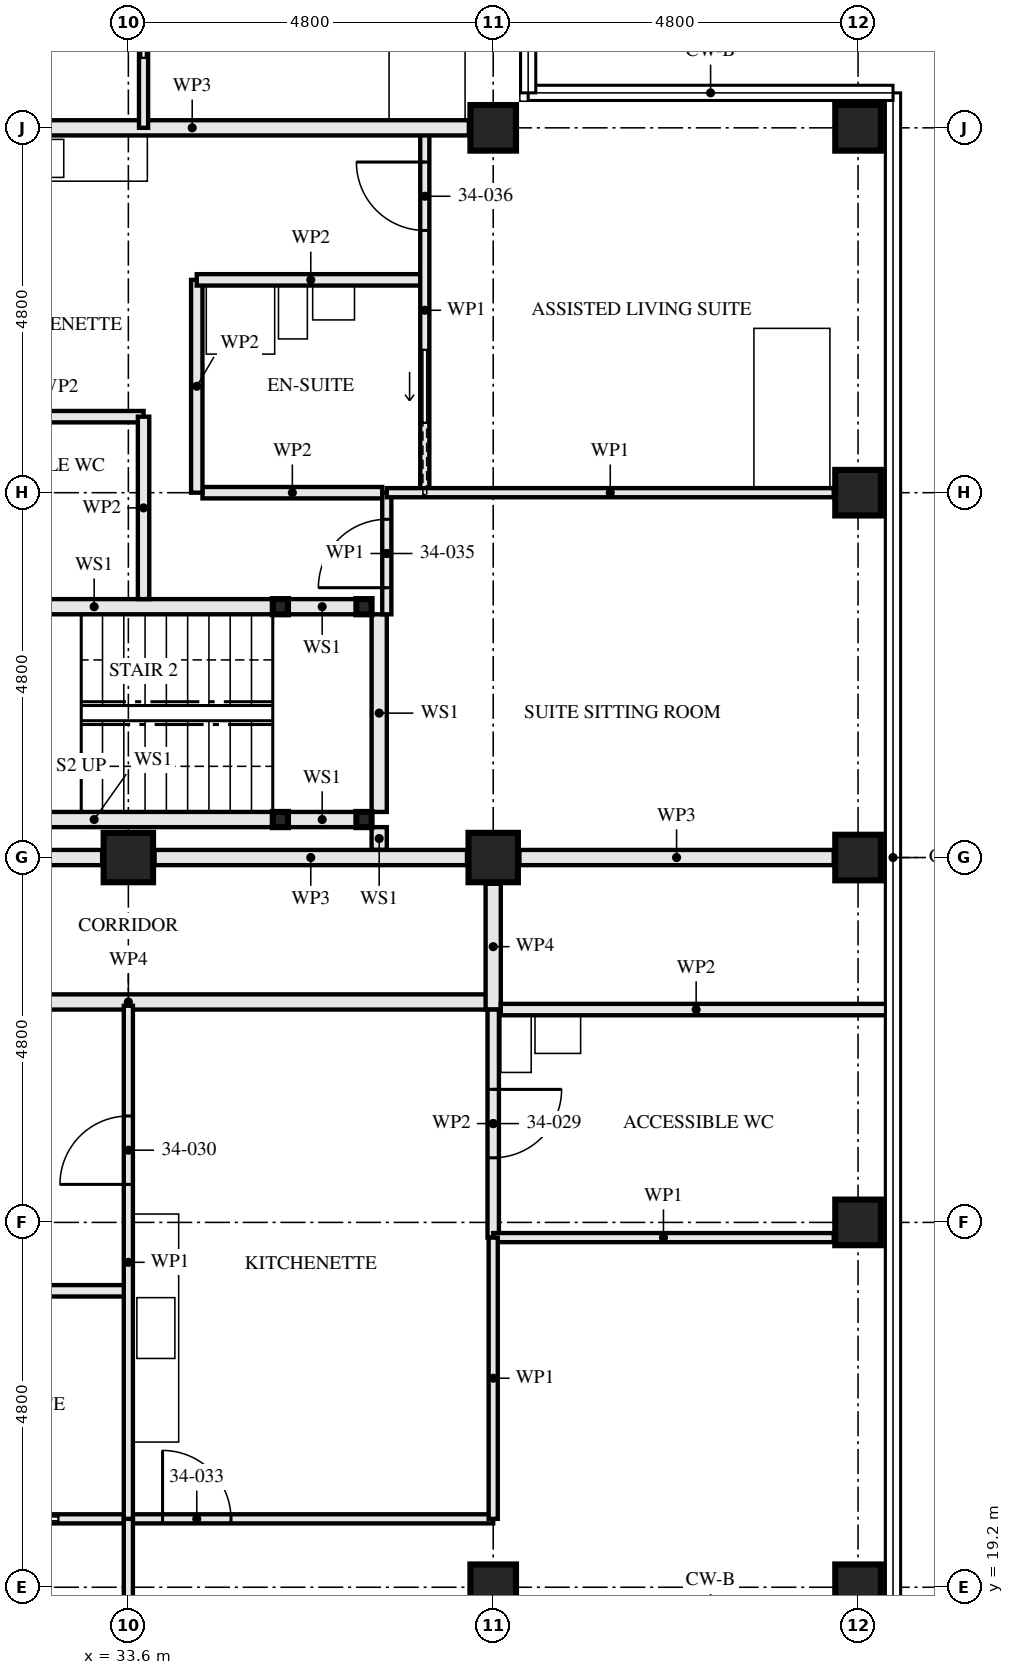
"""IFC4 building model, lengths in metres.
Left out: names, types, materials, properties, quantities, classifications, styles, units other than length and angle.
Written with IfcOpenShell. Run it as: python <this file> out.ifc"""

import sys

from ifc_helpers import new_model, si_unit, direction, frame, frame_2d, origin, origin_2d, place, context, subcontext, project, spatial, rectangle, hollow_rectangle, extrude, element, fill, save


model = new_model("IFC4")
c1 = context("Model", 3, precision=1e-05, world=origin(), true_north=direction((0.0, 1.0)))
c2 = subcontext(c1, "Body", "Model", "MODEL_VIEW")
j1 = project(units=[si_unit("LENGTHUNIT", "METRE"), si_unit("PLANEANGLEUNIT", "RADIAN")], contexts=[c1])
p1 = place(None, origin())
s1 = spatial("IfcSite", under=j1, at=p1, CompositionType="ELEMENT")
p2 = place(p1, origin())
s2 = spatial("IfcBuilding", under=s1, at=p2, CompositionType="ELEMENT")
p3 = place(p2, frame((0.0, 0.0, 126.0)))
s3 = spatial("IfcBuildingStorey", under=s2, at=p3, CompositionType="ELEMENT", Elevation=126.0)
p4 = place(p3, frame((33.6, 28.8, 0.0), z_axis=(0.0, 0.0, 1.0), x_axis=(0.0, 1.0, 0.0)))
e1 = element("IfcColumn", 1, at=p4, inside=s3, PredefinedType="COLUMN", context=c2, shape_type="SweptSolid", body=[
    extrude(hollow_rectangle(XDim=0.65, YDim=0.65, WallThickness=0.05, at=origin_2d()), origin(), (0.0, 0.0, 1.0), 3.5),
])
p5 = place(p3, frame((38.4, 19.2, 0.0), z_axis=(0.0, 0.0, 1.0), x_axis=(0.0, 1.0, 0.0)))
e2 = element("IfcColumn", 2, at=p5, inside=s3, PredefinedType="COLUMN", context=c2, shape_type="SweptSolid", body=[
    extrude(hollow_rectangle(XDim=0.6, YDim=0.6, WallThickness=0.08, at=origin_2d()), origin(), (0.0, 0.0, 1.0), 3.5),
])
p6 = place(p3, frame((38.4, 28.8, 0.0), z_axis=(0.0, 0.0, 1.0), x_axis=(0.0, 1.0, 0.0)))
e3 = element("IfcColumn", 3, at=p6, inside=s3, PredefinedType="COLUMN", context=c2, shape_type="SweptSolid", body=[
    extrude(hollow_rectangle(XDim=0.65, YDim=0.65, WallThickness=0.05, at=origin_2d()), origin(), (0.0, 0.0, 1.0), 3.5),
])
for number, where, z_axis, x_axis in (
    (4, (38.4, 38.4, 0.0), (0.0, 0.0, 1.0), (0.0, 1.0, 0.0)),
    (5, (43.2, 19.2, 0.0), (0.0, 0.0, 1.0), (0.0, 1.0, 0.0)),
    (6, (43.2, 24.0, 0.0), (0.0, 0.0, 1.0), (1.0, 0.0, 0.0)),
    (7, (43.2, 28.8, 0.0), (0.0, 0.0, 1.0), (0.0, 1.0, 0.0)),
    (8, (43.2, 33.6, 0.0), (0.0, 0.0, 1.0), (1.0, 0.0, 0.0)),
    (9, (43.2, 38.4, 0.0), (0.0, 0.0, 1.0), (0.0, 1.0, 0.0)),
):
    element("IfcColumn", number, at=place(p3, frame(where, z_axis=z_axis, x_axis=x_axis)), inside=s3, PredefinedType="COLUMN", context=c2, shape_type="SweptSolid", body=[
        extrude(hollow_rectangle(XDim=0.6, YDim=0.6, WallThickness=0.08, at=origin_2d()), origin(), (0.0, 0.0, 1.0), 3.5),
    ])
for number, where, z_axis, x_axis in (
    (10, (36.7, 29.3, 0.0), (0.0, 0.0, 1.0), (1.0, 0.0, 0.0)),
    (11, (36.7, 32.1, 0.0), (0.0, 0.0, 1.0), (1.0, 0.0, 0.0)),
    (12, (35.6, 29.3, 0.0), (0.0, 0.0, 1.0), (1.0, 0.0, 0.0)),
    (13, (35.6, 32.1, 0.0), (0.0, 0.0, 1.0), (1.0, 0.0, 0.0)),
):
    element("IfcColumn", number, at=place(p3, frame(where, z_axis=z_axis, x_axis=x_axis)), inside=s3, PredefinedType="COLUMN", context=c2, shape_type="SweptSolid", body=[
        extrude(hollow_rectangle(XDim=0.2, YDim=0.2, WallThickness=0.008, at=origin_2d()), origin(), (0.0, 0.0, 1.0), 3.33),
    ])
p7 = place(p3, frame((30.8, 23.1, 0.0), z_axis=(0.0, 0.0, 1.0), x_axis=(1.0, 0.0, 0.0)))
e14 = element("IfcWall", 14, at=p7, inside=s3, PredefinedType="PARTITIONING", context=c2, shape_type="SweptSolid", body=[
    extrude(rectangle(XDim=2.8, YDim=0.15, at=frame_2d((1.4, 0.0))), origin(), (0.0, 0.0, 1.0), 3.33),
])
p8 = place(p3, frame((38.4, 23.8, 0.0), z_axis=(0.0, 0.0, 1.0), x_axis=(0.0, 1.0, 0.0)))
e15 = element("IfcWall", 15, at=p8, inside=s3, PredefinedType="PARTITIONING", context=c2, shape_type="SweptSolid", body=[
    extrude(rectangle(XDim=3.0, YDim=0.15, at=frame_2d((1.5, 0.0))), origin(), (0.0, 0.0, 1.0), 2.55),
])
p9 = place(p8, frame((1.05, 0.0, 0.0)))
e16 = element("IfcOpeningElement", 16, at=p9, cuts=e15, PredefinedType="OPENING", context=c2, shape_type="SweptSolid", body=[
    extrude(rectangle(XDim=0.9, YDim=2.1, at=frame_2d((0.45, 1.05))), frame((0.0, 0.085, 0.0), z_axis=(0.0, -1.0, 0.0), x_axis=(1.0, 0.0, 0.0)), (0.0, 0.0, 1.0), 0.171),
])
p10 = place(p3, frame((33.6, 20.1, 0.0), z_axis=(0.0, 0.0, 1.0), x_axis=(0.0, 1.0, 0.0)))
e17 = element("IfcWall", 17, at=p10, inside=s3, PredefinedType="PARTITIONING", context=c2, shape_type="SweptSolid", body=[
    extrude(rectangle(XDim=6.75, YDim=0.12, at=frame_2d((3.375, 0.0))), origin(), (0.0, 0.0, 1.0), 2.55),
])
p11 = place(p10, frame((4.4, 0.0, 0.0)))
e18 = element("IfcOpeningElement", 18, at=p11, cuts=e17, PredefinedType="OPENING", context=c2, shape_type="SweptSolid", body=[
    extrude(rectangle(XDim=0.9, YDim=2.1, at=frame_2d((0.45, 1.05))), frame((0.0, 0.071, 0.0), z_axis=(0.0, -1.0, 0.0), x_axis=(1.0, 0.0, 0.0)), (0.0, 0.0, 1.0), 0.141),
])
p12 = place(p3, frame((28.8, 20.1, 0.0), z_axis=(0.0, 0.0, 1.0), x_axis=(1.0, 0.0, 0.0)))
e19 = element("IfcWall", 19, at=p12, inside=s3, PredefinedType="PARTITIONING", context=c2, shape_type="SweptSolid", body=[
    extrude(rectangle(XDim=4.8, YDim=0.12, at=frame_2d((2.4, 0.0))), origin(), (0.0, 0.0, 1.0), 3.33),
])
p13 = place(p12, frame((0.45, 0.0, 0.0)))
e20 = element("IfcOpeningElement", 20, at=p13, cuts=e19, PredefinedType="OPENING", context=c2, shape_type="SweptSolid", body=[
    extrude(rectangle(XDim=0.9, YDim=2.1, at=frame_2d((0.45, 1.05))), frame((0.0, 0.071, 0.0), z_axis=(0.0, -1.0, 0.0), x_axis=(1.0, 0.0, 0.0)), (0.0, 0.0, 1.0), 0.141),
])
p14 = place(p12, frame((2.925, 0.0, 0.0)))
e21 = element("IfcOpeningElement", 21, at=p14, cuts=e19, PredefinedType="OPENING", context=c2, shape_type="SweptSolid", body=[
    extrude(rectangle(XDim=0.95, YDim=2.1, at=frame_2d((0.475, 1.05))), frame((0.0, 0.071, 0.0), z_axis=(0.0, -1.0, 0.0), x_axis=(1.0, 0.0, 0.0)), (0.0, 0.0, 1.0), 0.141),
])
p15 = place(p3, frame((33.6, 20.1, 0.0), z_axis=(0.0, 0.0, 1.0), x_axis=(1.0, 0.0, 0.0)))
e22 = element("IfcWall", 22, at=p15, inside=s3, PredefinedType="PARTITIONING", context=c2, shape_type="SweptSolid", body=[
    extrude(rectangle(XDim=4.8, YDim=0.12, at=frame_2d((2.4, 0.0))), origin(), (0.0, 0.0, 1.0), 3.33),
])
p16 = place(p15, frame((0.45, 0.0, 0.0)))
e23 = element("IfcOpeningElement", 23, at=p16, cuts=e22, PredefinedType="OPENING", context=c2, shape_type="SweptSolid", body=[
    extrude(rectangle(XDim=0.9, YDim=2.1, at=frame_2d((0.45, 1.05))), frame((0.0, 0.071, 0.0), z_axis=(0.0, -1.0, 0.0), x_axis=(1.0, 0.0, 0.0)), (0.0, 0.0, 1.0), 0.141),
])
p17 = place(p3, frame((38.4, 23.8, 0.0), z_axis=(0.0, 0.0, 1.0), x_axis=(1.0, 0.0, 0.0)))
e24 = element("IfcWall", 24, at=p17, inside=s3, PredefinedType="PARTITIONING", context=c2, shape_type="SweptSolid", body=[
    extrude(rectangle(XDim=4.48, YDim=0.12, at=frame_2d((2.24, 0.0))), origin(), (0.0, 0.0, 1.0), 3.33),
])
p18 = place(p3, frame((33.6, 14.72, 0.0), z_axis=(0.0, 0.0, 1.0), x_axis=(0.0, 1.0, 0.0)))
e25 = element("IfcWall", 25, at=p18, inside=s3, PredefinedType="PARTITIONING", context=c2, shape_type="SweptSolid", body=[
    extrude(rectangle(XDim=5.38, YDim=0.12, at=frame_2d((2.69, 0.0))), origin(), (0.0, 0.0, 1.0), 2.55),
])
p19 = place(p3, frame((38.4, 20.1, 0.0), z_axis=(0.0, 0.0, 1.0), x_axis=(0.0, 1.0, 0.0)))
e26 = element("IfcWall", 26, at=p19, inside=s3, PredefinedType="PARTITIONING", context=c2, shape_type="SweptSolid", body=[
    extrude(rectangle(XDim=3.7, YDim=0.12, at=frame_2d((1.85, 0.0))), origin(), (0.0, 0.0, 1.0), 3.33),
])
p20 = place(p3, frame((28.8, 26.9, 0.0), z_axis=(0.0, 0.0, 1.0), x_axis=(1.0, 0.0, 0.0)))
e27 = element("IfcWall", 27, at=p20, inside=s3, PredefinedType="PARTITIONING", context=c2, shape_type="SweptSolid", body=[
    extrude(rectangle(XDim=9.6, YDim=0.2, at=frame_2d((4.8, 0.0))), origin(), (0.0, 0.0, 1.0), 3.33),
])
p21 = place(p20, frame((0.4, 0.0, 0.0)))
e28 = element("IfcOpeningElement", 28, at=p21, cuts=e27, PredefinedType="OPENING", context=c2, shape_type="SweptSolid", body=[
    extrude(rectangle(XDim=1.0, YDim=2.1, at=frame_2d((0.5, 1.05))), frame((0.0, 0.111, 0.0), z_axis=(0.0, -1.0, 0.0), x_axis=(1.0, 0.0, 0.0)), (0.0, 0.0, 1.0), 0.221),
])
p22 = place(p3, frame((38.4, 26.8, 0.0), z_axis=(0.0, 0.0, 1.0), x_axis=(0.0, 1.0, 0.0)))
e29 = element("IfcWall", 29, at=p22, inside=s3, PredefinedType="PARTITIONING", context=c2, shape_type="SweptSolid", body=[
    extrude(rectangle(XDim=1.655, YDim=0.2, at=frame_2d((0.828, 0.0))), origin(), (0.0, 0.0, 1.0), 3.33),
])
p23 = place(p3, frame((36.6, 29.3, 0.0), z_axis=(0.0, 0.0, 1.0), x_axis=(-1.0, 0.0, 0.0)))
e30 = element("IfcWall", 30, at=p23, inside=s3, PredefinedType="SOLIDWALL", context=c2, shape_type="SweptSolid", body=[
    extrude(rectangle(XDim=0.9, YDim=0.2, at=frame_2d((0.45, 0.0))), origin(), (0.0, 0.0, 1.0), 2.99),
])
p24 = place(p3, frame((35.5, 29.3, 0.0), z_axis=(0.0, 0.0, 1.0), x_axis=(-1.0, 0.0, 0.0)))
e31 = element("IfcWall", 31, at=p24, inside=s3, PredefinedType="SOLIDWALL", context=c2, shape_type="SweptSolid", body=[
    extrude(rectangle(XDim=4.7, YDim=0.2, at=frame_2d((2.35, 0.0))), origin(), (0.0, 0.0, 1.0), 2.99),
])
p25 = place(p3, frame((36.6, 32.1, 0.0), z_axis=(0.0, 0.0, 1.0), x_axis=(-1.0, 0.0, 0.0)))
e32 = element("IfcWall", 32, at=p25, inside=s3, PredefinedType="SOLIDWALL", context=c2, shape_type="SweptSolid", body=[
    extrude(rectangle(XDim=0.9, YDim=0.2, at=frame_2d((0.45, 0.0))), origin(), (0.0, 0.0, 1.0), 2.99),
])
p26 = place(p3, frame((35.5, 32.1, 0.0), z_axis=(0.0, 0.0, 1.0), x_axis=(-1.0, 0.0, 0.0)))
e33 = element("IfcWall", 33, at=p26, inside=s3, PredefinedType="SOLIDWALL", context=c2, shape_type="SweptSolid", body=[
    extrude(rectangle(XDim=4.7, YDim=0.2, at=frame_2d((2.35, 0.0))), origin(), (0.0, 0.0, 1.0), 2.99),
])
p27 = place(p3, frame((36.9, 28.9, 0.0), z_axis=(0.0, 0.0, 1.0), x_axis=(0.0, 1.0, 0.0)))
e34 = element("IfcWall", 34, at=p27, inside=s3, PredefinedType="SOLIDWALL", context=c2, shape_type="SweptSolid", body=[
    extrude(rectangle(XDim=0.3, YDim=0.2, at=frame_2d((0.15, 0.0))), origin(), (0.0, 0.0, 1.0), 3.33),
])
p28 = place(p3, frame((36.9, 29.4, 0.0), z_axis=(0.0, 0.0, 1.0), x_axis=(0.0, 1.0, 0.0)))
e35 = element("IfcWall", 35, at=p28, inside=s3, PredefinedType="SOLIDWALL", context=c2, shape_type="SweptSolid", body=[
    extrude(rectangle(XDim=2.6, YDim=0.2, at=frame_2d((1.3, 0.0))), origin(), (0.0, 0.0, 1.0), 3.33),
])
p29 = place(p3, frame((33.8, 32.2, 0.0), z_axis=(0.0, 0.0, 1.0), x_axis=(0.0, 1.0, 0.0)))
e36 = element("IfcWall", 36, at=p29, inside=s3, PredefinedType="PARTITIONING", context=c2, shape_type="SweptSolid", body=[
    extrude(rectangle(XDim=2.4, YDim=0.15, at=frame_2d((1.2, 0.0))), origin(), (0.0, 0.0, 1.0), 2.55),
])
for number, where, z_axis, x_axis in (
    (37, (33.8, 34.6, 0.0), (0.0, 0.0, 1.0), (-1.0, 0.0, 0.0)),
    (38, (37.5, 36.4, 0.0), (0.0, 0.0, 1.0), (-1.0, 0.0, 0.0)),
):
    element("IfcWall", number, at=place(p3, frame(where, z_axis=z_axis, x_axis=x_axis)), inside=s3, PredefinedType="PARTITIONING", context=c2, shape_type="SweptSolid", body=[
        extrude(rectangle(XDim=3.0, YDim=0.15, at=frame_2d((1.5, 0.0))), origin(), (0.0, 0.0, 1.0), 3.33),
    ])
p30 = place(p3, frame((34.5, 33.6, 0.0), z_axis=(0.0, 0.0, 1.0), x_axis=(0.0, 1.0, 0.0)))
e39 = element("IfcWall", 39, at=p30, inside=s3, PredefinedType="PARTITIONING", context=c2, shape_type="SweptSolid", body=[
    extrude(rectangle(XDim=2.8, YDim=0.15, at=frame_2d((1.4, 0.0))), origin(), (0.0, 0.0, 1.0), 3.33),
])
p31 = place(p3, frame((37.0, 32.0, 0.0), z_axis=(0.0, 0.0, 1.0), x_axis=(0.0, 1.0, 0.0)))
e40 = element("IfcWall", 40, at=p31, inside=s3, PredefinedType="PARTITIONING", context=c2, shape_type="SweptSolid", body=[
    extrude(rectangle(XDim=1.6, YDim=0.12, at=frame_2d((0.8, 0.0))), origin(), (0.0, 0.0, 1.0), 3.33),
])
p32 = place(p31, frame((0.35, 0.0, 0.0)))
e41 = element("IfcOpeningElement", 41, at=p32, cuts=e40, PredefinedType="OPENING", context=c2, shape_type="SweptSolid", body=[
    extrude(rectangle(XDim=0.9, YDim=2.1, at=frame_2d((0.45, 1.05))), frame((0.0, 0.071, 0.0), z_axis=(0.0, -1.0, 0.0), x_axis=(1.0, 0.0, 0.0)), (0.0, 0.0, 1.0), 0.141),
])
p33 = place(p3, frame((37.5, 33.6, 0.0), z_axis=(0.0, 0.0, 1.0), x_axis=(0.0, 1.0, 0.0)))
e42 = element("IfcWall", 42, at=p33, inside=s3, PredefinedType="PARTITIONING", context=c2, shape_type="SweptSolid", body=[
    extrude(rectangle(XDim=4.8, YDim=0.12, at=frame_2d((2.4, 0.0))), origin(), (0.0, 0.0, 1.0), 3.33),
])
p34 = place(p33, frame((3.45, 0.0, 0.0)))
e43 = element("IfcOpeningElement", 43, at=p34, cuts=e42, PredefinedType="OPENING", context=c2, shape_type="SweptSolid", body=[
    extrude(rectangle(XDim=0.9, YDim=2.1, at=frame_2d((0.45, 1.05))), frame((0.0, 0.071, 0.0), z_axis=(0.0, -1.0, 0.0), x_axis=(1.0, 0.0, 0.0)), (0.0, 0.0, 1.0), 0.141),
])
p35 = place(p33, frame((0.925, 0.0, 0.0)))
e44 = element("IfcOpeningElement", 44, at=p35, cuts=e42, PredefinedType="OPENING", context=c2, shape_type="SweptSolid", body=[
    extrude(rectangle(XDim=0.95, YDim=2.1, at=frame_2d((0.475, 1.05))), frame((0.0, 0.071, 0.0), z_axis=(0.0, -1.0, 0.0), x_axis=(1.0, 0.0, 0.0)), (0.0, 0.0, 1.0), 0.141),
])
p36 = place(p3, frame((42.88, 33.6, 0.0), z_axis=(0.0, 0.0, 1.0), x_axis=(-1.0, 0.0, 0.0)))
e45 = element("IfcWall", 45, at=p36, inside=s3, PredefinedType="PARTITIONING", context=c2, shape_type="SweptSolid", body=[
    extrude(rectangle(XDim=5.88, YDim=0.12, at=frame_2d((2.94, 0.0))), origin(), (0.0, 0.0, 1.0), 2.55),
])
p37 = place(p3, frame((38.08, 38.4, 0.0), z_axis=(0.0, 0.0, 1.0), x_axis=(-1.0, 0.0, 0.0)))
e46 = element("IfcWall", 46, at=p37, inside=s3, PredefinedType="PARTITIONING", context=c2, shape_type="SweptSolid", body=[
    extrude(rectangle(XDim=7.28, YDim=0.2, at=frame_2d((3.64, 0.0))), origin(), (0.0, 0.0, 1.0), 2.55),
])
p38 = place(p3, frame((33.8, 38.4, 0.0), z_axis=(0.0, 0.0, 1.0), x_axis=(0.0, 1.0, 0.0)))
e47 = element("IfcWall", 47, at=p38, inside=s3, PredefinedType="PARTITIONING", context=c2, shape_type="SweptSolid", body=[
    extrude(rectangle(XDim=4.48, YDim=0.12, at=frame_2d((2.24, 0.0))), origin(), (0.0, 0.0, 1.0), 3.33),
])
p39 = place(p38, frame((2.975, 0.0, 0.0)))
e48 = element("IfcOpeningElement", 48, at=p39, cuts=e47, PredefinedType="OPENING", context=c2, shape_type="SweptSolid", body=[
    extrude(rectangle(XDim=0.9, YDim=2.1, at=frame_2d((0.45, 1.05))), frame((0.0, 0.071, 0.0), z_axis=(0.0, -1.0, 0.0), x_axis=(1.0, 0.0, 0.0)), (0.0, 0.0, 1.0), 0.141),
])
p40 = place(p38, frame((0.925, 0.0, 0.0)))
e49 = element("IfcOpeningElement", 49, at=p40, cuts=e47, PredefinedType="OPENING", context=c2, shape_type="SweptSolid", body=[
    extrude(rectangle(XDim=0.95, YDim=2.1, at=frame_2d((0.475, 1.05))), frame((0.0, 0.071, 0.0), z_axis=(0.0, -1.0, 0.0), x_axis=(1.0, 0.0, 0.0)), (0.0, 0.0, 1.0), 0.141),
])
p41 = place(p3, frame((42.88, 28.8, 0.0), z_axis=(0.0, 0.0, 1.0), x_axis=(-1.0, 0.0, 0.0)))
e50 = element("IfcWall", 50, at=p41, inside=s3, PredefinedType="PARTITIONING", context=c2, shape_type="SweptSolid", body=[
    extrude(rectangle(XDim=4.135, YDim=0.2, at=frame_2d((2.067, 0.0))), origin(), (0.0, 0.0, 1.0), 2.32),
])
p42 = place(p3, frame((38.055, 28.8, 0.0), z_axis=(0.0, 0.0, 1.0), x_axis=(-1.0, 0.0, 0.0)))
e51 = element("IfcWall", 51, at=p42, inside=s3, PredefinedType="PARTITIONING", context=c2, shape_type="SweptSolid", body=[
    extrude(rectangle(XDim=4.11, YDim=0.2, at=frame_2d((2.055, 0.0))), origin(), (0.0, 0.0, 1.0), 2.32),
])
p43 = place(p3, frame((33.255, 28.8, 0.0), z_axis=(0.0, 0.0, 1.0), x_axis=(-1.0, 0.0, 0.0)))
e52 = element("IfcWall", 52, at=p43, inside=s3, PredefinedType="PARTITIONING", context=c2, shape_type="SweptSolid", body=[
    extrude(rectangle(XDim=2.555, YDim=0.2, at=frame_2d((1.277, 0.0))), origin(), (0.0, 0.0, 1.0), 2.32),
])
p44 = place(p3, frame((38.5, 26.8, 0.0), z_axis=(0.0, 0.0, 1.0), x_axis=(1.0, 0.0, 0.0)))
e53 = element("IfcWall", 53, at=p44, inside=s3, PredefinedType="PARTITIONING", context=c2, shape_type="SweptSolid", body=[
    extrude(rectangle(XDim=5.14, YDim=0.15, at=frame_2d((2.57, 0.0))), origin(), (0.0, 0.0, 1.0), 2.32),
])
p45 = place(p3, frame((36.94, 33.6, 0.0), z_axis=(0.0, 0.0, 1.0), x_axis=(-1.0, 0.0, 0.0)))
e54 = element("IfcWall", 54, at=p45, inside=s3, PredefinedType="PARTITIONING", context=c2, shape_type="SweptSolid", body=[
    extrude(rectangle(XDim=2.365, YDim=0.15, at=frame_2d((1.183, 0.0))), origin(), (0.0, 0.0, 1.0), 2.55),
])
p46 = place(p9, frame((0.9, 0.0, 0.0), z_axis=(0.0, 0.0, 1.0), x_axis=(-1.0, 0.0, 0.0)))
e55 = element("IfcDoor", 55, at=p46, inside=s3, OperationType="SINGLE_SWING_RIGHT", PredefinedType="DOOR", context=c2, shape_type="SweptSolid", body=[
    extrude(rectangle(XDim=0.9, YDim=2.1, at=frame_2d((0.45, 1.05))), frame((0.0, 0.022, 0.0), z_axis=(0.0, -1.0, 0.0), x_axis=(1.0, 0.0, 0.0)), (0.0, 0.0, 1.0), 0.044),
])
fill(e16, e55)
p47 = place(p11, origin())
e56 = element("IfcDoor", 56, at=p47, inside=s3, OperationType="SINGLE_SWING_RIGHT", PredefinedType="DOOR", context=c2, shape_type="SweptSolid", body=[
    extrude(rectangle(XDim=0.9, YDim=2.1, at=frame_2d((0.45, 1.05))), frame((0.0, 0.022, 0.0), z_axis=(0.0, -1.0, 0.0), x_axis=(1.0, 0.0, 0.0)), (0.0, 0.0, 1.0), 0.044),
])
fill(e18, e56)
p48 = place(p14, origin())
e57 = element("IfcDoor", 57, at=p48, inside=s3, OperationType="SLIDING_TO_RIGHT", PredefinedType="DOOR", context=c2, shape_type="SweptSolid", body=[
    extrude(rectangle(XDim=0.95, YDim=2.1, at=frame_2d((0.475, 1.05))), frame((0.0, 0.022, 0.0), z_axis=(0.0, -1.0, 0.0), x_axis=(1.0, 0.0, 0.0)), (0.0, 0.0, 1.0), 0.044),
])
fill(e21, e57)
p49 = place(p16, origin())
e58 = element("IfcDoor", 58, at=p49, inside=s3, OperationType="SINGLE_SWING_RIGHT", PredefinedType="DOOR", context=c2, shape_type="SweptSolid", body=[
    extrude(rectangle(XDim=0.9, YDim=2.1, at=frame_2d((0.45, 1.05))), frame((0.0, 0.022, 0.0), z_axis=(0.0, -1.0, 0.0), x_axis=(1.0, 0.0, 0.0)), (0.0, 0.0, 1.0), 0.044),
])
fill(e23, e58)
p50 = place(p32, origin())
e59 = element("IfcDoor", 59, at=p50, inside=s3, OperationType="SINGLE_SWING_RIGHT", PredefinedType="DOOR", context=c2, shape_type="SweptSolid", body=[
    extrude(rectangle(XDim=0.9, YDim=2.1, at=frame_2d((0.45, 1.05))), frame((0.0, 0.022, 0.0), z_axis=(0.0, -1.0, 0.0), x_axis=(1.0, 0.0, 0.0)), (0.0, 0.0, 1.0), 0.044),
])
fill(e41, e59)
p51 = place(p34, origin())
e60 = element("IfcDoor", 60, at=p51, inside=s3, OperationType="SINGLE_SWING_LEFT", PredefinedType="DOOR", context=c2, shape_type="SweptSolid", body=[
    extrude(rectangle(XDim=0.9, YDim=2.1, at=frame_2d((0.45, 1.05))), frame((0.0, 0.022, 0.0), z_axis=(0.0, -1.0, 0.0), x_axis=(1.0, 0.0, 0.0)), (0.0, 0.0, 1.0), 0.044),
])
fill(e43, e60)
p52 = place(p35, origin())
e61 = element("IfcDoor", 61, at=p52, inside=s3, OperationType="SLIDING_TO_RIGHT", PredefinedType="DOOR", context=c2, shape_type="SweptSolid", body=[
    extrude(rectangle(XDim=0.95, YDim=2.1, at=frame_2d((0.475, 1.05))), frame((0.0, 0.022, 0.0), z_axis=(0.0, -1.0, 0.0), x_axis=(1.0, 0.0, 0.0)), (0.0, 0.0, 1.0), 0.044),
])
fill(e44, e61)
p53 = place(p40, origin())
e62 = element("IfcDoor", 62, at=p53, inside=s3, OperationType="SLIDING_TO_LEFT", PredefinedType="DOOR", context=c2, shape_type="SweptSolid", body=[
    extrude(rectangle(XDim=0.95, YDim=2.1, at=frame_2d((0.475, 1.05))), frame((0.0, 0.022, 0.0), z_axis=(0.0, -1.0, 0.0), x_axis=(1.0, 0.0, 0.0)), (0.0, 0.0, 1.0), 0.044),
])
fill(e49, e62)
save(model, sys.argv[1])
